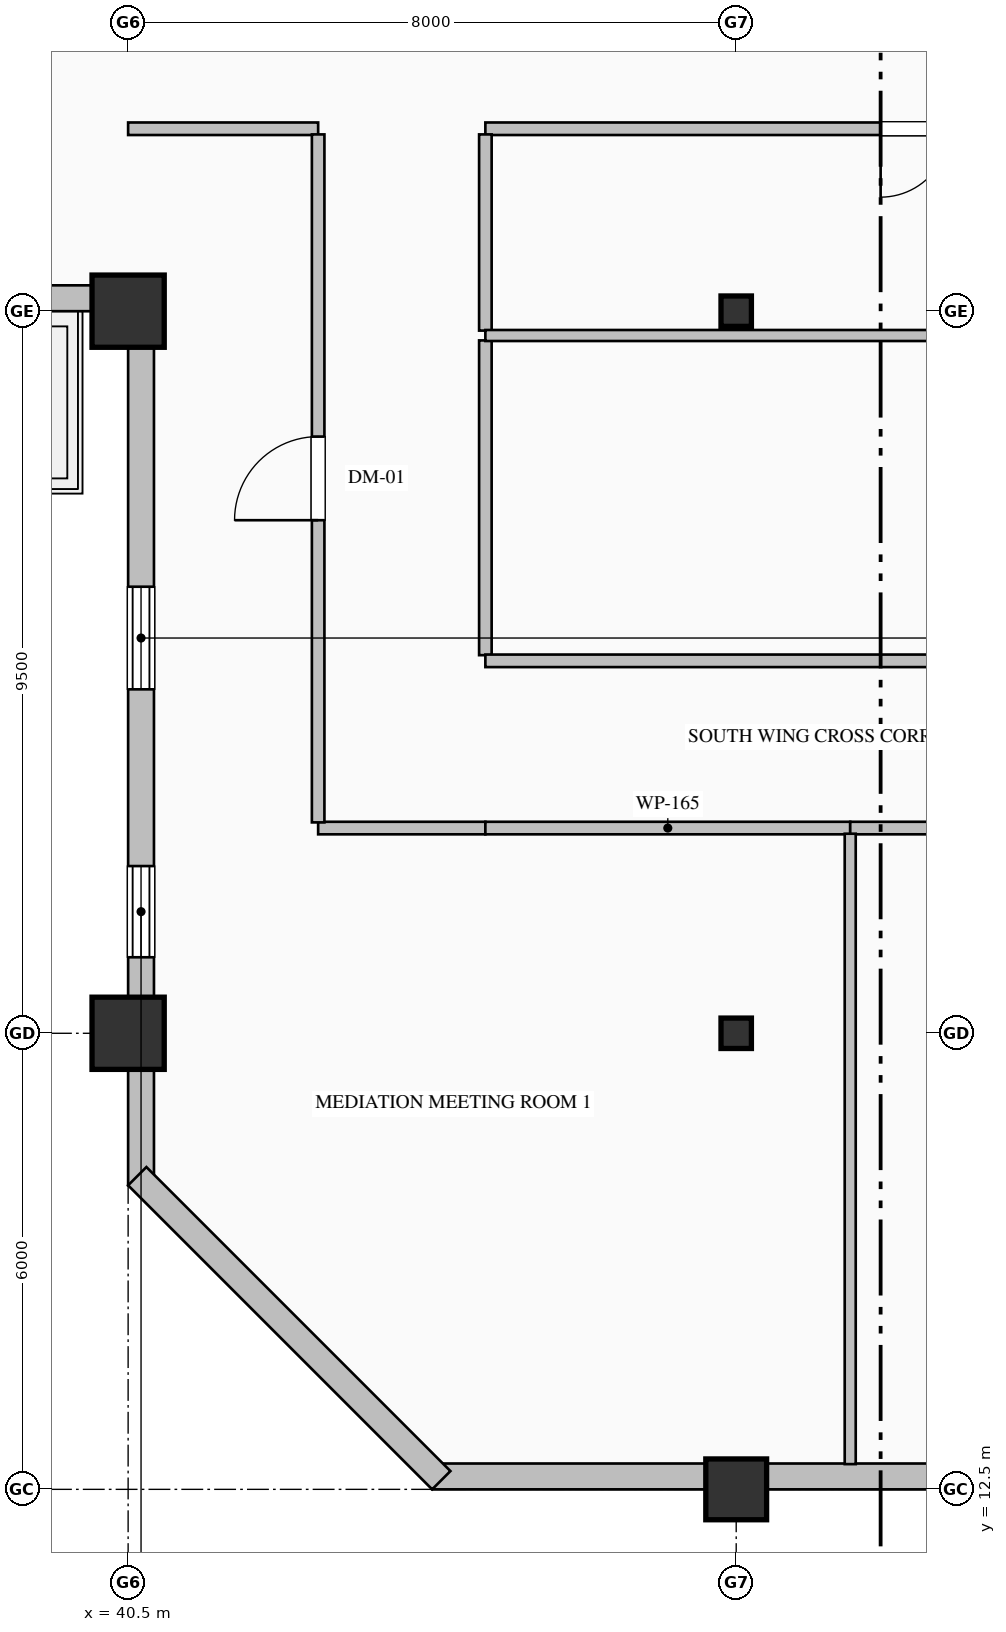
"""IFC4 building model, lengths in metres.
Left out: names, types, materials, properties, quantities, classifications, styles, units other than length and angle.
Written with IfcOpenShell. Run it as: python <this file> out.ifc"""

import sys

from ifc_helpers import new_model, si_unit, direction, frame, frame_2d, origin, origin_2d, place, context, subcontext, project, spatial, rectangle, hollow_rectangle, i_section, extrude, element, fill, save


model = new_model("IFC4")
c1 = context("Model", 3, precision=1e-05, world=origin(), true_north=direction((0.0, 1.0)))
c2 = subcontext(c1, "Body", "Model", "MODEL_VIEW")
j1 = project(units=[si_unit("LENGTHUNIT", "METRE"), si_unit("PLANEANGLEUNIT", "RADIAN")], contexts=[c1])
p1 = place(None, origin())
s1 = spatial("IfcSite", under=j1, at=p1, CompositionType="ELEMENT")
p2 = place(p1, origin())
s2 = spatial("IfcBuilding", under=s1, at=p2, CompositionType="ELEMENT")
p3 = place(p2, frame((0.0, 0.0, 273.8)))
s3 = spatial("IfcBuildingStorey", under=s2, at=p3, CompositionType="ELEMENT", Elevation=273.8)
for number, where, z_axis, x_axis in (
    (1, (40.5, 18.5, 0.0), (0.0, 0.0, 1.0), (1.0, 0.0, 0.0)),
    (2, (40.5, 28.0, 0.0), (0.0, 0.0, 1.0), (1.0, 0.0, 0.0)),
):
    element("IfcColumn", number, at=place(p3, frame(where, z_axis=z_axis, x_axis=x_axis)), inside=s3, PredefinedType="COLUMN", context=c2, shape_type="SweptSolid", body=[
        extrude(hollow_rectangle(XDim=0.95, YDim=0.95, WallThickness=0.036, at=origin_2d()), origin(), (0.0, 0.0, 1.0), 4.0),
    ])
p4 = place(p3, frame((48.5, 12.5, 0.0), z_axis=(0.0, 0.0, 1.0), x_axis=(1.0, 0.0, 0.0)))
e3 = element("IfcColumn", 3, at=p4, inside=s3, PredefinedType="COLUMN", context=c2, shape_type="SweptSolid", body=[
    extrude(hollow_rectangle(XDim=0.8, YDim=0.8, WallThickness=0.032, at=origin_2d()), origin(), (0.0, 0.0, 1.0), 4.0),
])
for number, where, z_axis, x_axis in (
    (4, (48.5, 18.5, 0.0), (0.0, 0.0, 1.0), (1.0, 0.0, 0.0)),
    (5, (48.5, 28.0, 0.0), (0.0, 0.0, 1.0), (1.0, 0.0, 0.0)),
):
    element("IfcColumn", number, at=place(p3, frame(where, z_axis=z_axis, x_axis=x_axis)), inside=s3, PredefinedType="COLUMN", context=c2, shape_type="SweptSolid", body=[
        extrude(i_section(OverallWidth=0.4, OverallDepth=0.4, WebThickness=0.013, FlangeThickness=0.021, FilletRadius=0.022, at=origin_2d()), origin(), (0.0, 0.0, 1.0), 4.0),
    ])
p5 = place(p3, frame((40.67, 16.5, 0.0), z_axis=(0.0, 0.0, 1.0), x_axis=(0.0, 1.0, 0.0)))
e6 = element("IfcWall", 6, at=p5, inside=s3, PredefinedType="SOLIDWALL", context=c2, shape_type="SweptSolid", body=[
    extrude(rectangle(XDim=11.84, YDim=0.34, at=frame_2d((5.92, 0.0))), origin(), (0.0, 0.0, 1.0), 3.187),
])
p6 = place(p5, frame((3.0, 0.0, 0.9)))
e7 = element("IfcOpeningElement", 7, at=p6, cuts=e6, PredefinedType="OPENING", context=c2, shape_type="SweptSolid", body=[
    extrude(rectangle(XDim=1.2, YDim=1.85, at=frame_2d((0.6, 0.925))), frame((0.0, 0.18, 0.0), z_axis=(0.0, -1.0, 0.0), x_axis=(1.0, 0.0, 0.0)), (0.0, 0.0, 1.0), 0.36),
])
p7 = place(p5, frame((6.525, 0.0, 0.9)))
e8 = element("IfcOpeningElement", 8, at=p7, cuts=e6, PredefinedType="OPENING", context=c2, shape_type="SweptSolid", body=[
    extrude(rectangle(XDim=1.35, YDim=1.85, at=frame_2d((0.675, 0.925))), frame((0.0, 0.18, 0.0), z_axis=(0.0, -1.0, 0.0), x_axis=(1.0, 0.0, 0.0)), (0.0, 0.0, 1.0), 0.36),
])
p8 = place(p3, frame((40.52, 28.17, 0.0), z_axis=(0.0, 0.0, 1.0), x_axis=(-1.0, 0.0, 0.0)))
e9 = element("IfcWall", 9, at=p8, inside=s3, PredefinedType="SOLIDWALL", context=c2, shape_type="SweptSolid", body=[
    extrude(rectangle(XDim=27.52, YDim=0.34, at=frame_2d((13.76, 0.0))), origin(), (0.0, 0.0, 1.0), 3.187),
])
p9 = place(p8, frame((13.725, 0.0, 0.9)))
e10 = element("IfcOpeningElement", 10, at=p9, cuts=e9, PredefinedType="OPENING", context=c2, shape_type="SweptSolid", body=[
    extrude(rectangle(XDim=1.35, YDim=1.85, at=frame_2d((0.675, 0.925))), frame((0.0, 0.18, 0.0), z_axis=(0.0, -1.0, 0.0), x_axis=(1.0, 0.0, 0.0)), (0.0, 0.0, 1.0), 0.36),
])
p10 = place(p8, frame((17.4, 0.0, 0.7)))
e11 = element("IfcOpeningElement", 11, at=p10, cuts=e9, PredefinedType="OPENING", context=c2, shape_type="SweptSolid", body=[
    extrude(rectangle(XDim=1.2, YDim=1.85, at=frame_2d((0.6, 0.925))), frame((0.0, 0.18, 0.0), z_axis=(0.0, -1.0, 0.0), x_axis=(1.0, 0.0, 0.0)), (0.0, 0.0, 1.0), 0.36),
])
p11 = place(p8, frame((21.0, 0.0, 0.9)))
e12 = element("IfcOpeningElement", 12, at=p11, cuts=e9, PredefinedType="OPENING", context=c2, shape_type="SweptSolid", body=[
    extrude(rectangle(XDim=1.2, YDim=1.85, at=frame_2d((0.6, 0.925))), frame((0.0, 0.18, 0.0), z_axis=(0.0, -1.0, 0.0), x_axis=(1.0, 0.0, 0.0)), (0.0, 0.0, 1.0), 0.36),
])
p12 = place(p8, frame((11.395, 0.0, 0.0)))
e13 = element("IfcOpeningElement", 13, at=p12, cuts=e9, PredefinedType="OPENING", context=c2, shape_type="SweptSolid", body=[
    extrude(rectangle(XDim=1.25, YDim=2.25, at=frame_2d((0.625, 1.125))), frame((0.0, 0.18, 0.0), z_axis=(0.0, -1.0, 0.0), x_axis=(1.0, 0.0, 0.0)), (0.0, 0.0, 1.0), 0.36),
])
p13 = place(p3, frame((60.0, 12.67, 0.0), z_axis=(0.0, 0.0, 1.0), x_axis=(-1.0, 0.0, 0.0)))
e14 = element("IfcWall", 14, at=p13, inside=s3, PredefinedType="SOLIDWALL", context=c2, shape_type="SweptSolid", body=[
    extrude(rectangle(XDim=15.5, YDim=0.34, at=frame_2d((7.75, 0.0))), origin(), (0.0, 0.0, 1.0), 3.325),
])
p14 = place(p13, frame((6.6, 0.0, 0.9)))
e15 = element("IfcOpeningElement", 15, at=p14, cuts=e14, PredefinedType="OPENING", context=c2, shape_type="SweptSolid", body=[
    extrude(rectangle(XDim=1.2, YDim=1.85, at=frame_2d((0.6, 0.925))), frame((0.0, 0.18, 0.0), z_axis=(0.0, -1.0, 0.0), x_axis=(1.0, 0.0, 0.0)), (0.0, 0.0, 1.0), 0.36),
])
p15 = place(p3, frame((44.62, 12.62, 0.0), z_axis=(0.0, 0.0, 1.0), x_axis=(-0.707106781187, 0.707106781187, 0.0)))
e16 = element("IfcWall", 16, at=p15, inside=s3, PredefinedType="SOLIDWALL", context=c2, shape_type="SweptSolid", body=[
    extrude(rectangle(XDim=5.657, YDim=0.34, at=frame_2d((2.828, 0.0))), origin(), (0.0, 0.0, 1.0), 3.775),
])
p16 = place(p3, frame((56.5, 30.4, 0.0), z_axis=(0.0, 0.0, 1.0), x_axis=(-1.0, 0.0, 0.0)))
e17 = element("IfcWall", 17, at=p16, inside=s3, PredefinedType="PARTITIONING", context=c2, shape_type="SweptSolid", body=[
    extrude(rectangle(XDim=11.3, YDim=0.165, at=frame_2d((5.65, 0.0))), origin(), (0.0, 0.0, 1.0), 3.775),
])
p17 = place(p16, frame((5.2, 0.0, 0.0)))
e18 = element("IfcOpeningElement", 18, at=p17, cuts=e17, PredefinedType="OPENING", context=c2, shape_type="SweptSolid", body=[
    extrude(rectangle(XDim=0.9, YDim=2.15, at=frame_2d((0.45, 1.075))), frame((0.0, 0.093, 0.0), z_axis=(0.0, -1.0, 0.0), x_axis=(1.0, 0.0, 0.0)), (0.0, 0.0, 1.0), 0.185),
])
p18 = place(p3, frame((43.0, 30.4, 0.0), z_axis=(0.0, 0.0, 1.0), x_axis=(-1.0, 0.0, 0.0)))
e19 = element("IfcWall", 19, at=p18, inside=s3, PredefinedType="PARTITIONING", context=c2, shape_type="SweptSolid", body=[
    extrude(rectangle(XDim=2.5, YDim=0.165, at=frame_2d((1.25, 0.0))), origin(), (0.0, 0.0, 1.0), 3.775),
])
p19 = place(p3, frame((45.2, 27.615, 0.0), z_axis=(0.0, 0.0, 1.0), x_axis=(0.0, -1.0, 0.0)))
e20 = element("IfcWall", 20, at=p19, inside=s3, PredefinedType="PARTITIONING", context=c2, shape_type="SweptSolid", body=[
    extrude(rectangle(XDim=4.141, YDim=0.165, at=frame_2d((2.07, 0.0))), origin(), (0.0, 0.0, 1.0), 3.775),
])
p20 = place(p3, frame((45.2, 30.325, 0.0), z_axis=(0.0, 0.0, 1.0), x_axis=(0.0, -1.0, 0.0)))
e21 = element("IfcWall", 21, at=p20, inside=s3, PredefinedType="PARTITIONING", context=c2, shape_type="SweptSolid", body=[
    extrude(rectangle(XDim=2.581, YDim=0.165, at=frame_2d((1.291, 0.0))), origin(), (0.0, 0.0, 1.0), 3.775),
])
p21 = place(p3, frame((45.2, 21.2, 0.0), z_axis=(0.0, 0.0, 1.0), x_axis=(-1.0, 0.0, 0.0)))
e22 = element("IfcWall", 22, at=p21, inside=s3, PredefinedType="PARTITIONING", context=c2, shape_type="SweptSolid", body=[
    extrude(rectangle(XDim=2.2, YDim=0.165, at=frame_2d((1.1, 0.0))), origin(), (0.0, 0.0, 1.0), 3.775),
])
p22 = place(p3, frame((43.0, 21.274, 0.0), z_axis=(0.0, 0.0, 1.0), x_axis=(0.0, 1.0, 0.0)))
e23 = element("IfcWall", 23, at=p22, inside=s3, PredefinedType="PARTITIONING", context=c2, shape_type="SweptSolid", body=[
    extrude(rectangle(XDim=9.051, YDim=0.165, at=frame_2d((4.525, 0.0))), origin(), (0.0, 0.0, 1.0), 3.775),
])
p23 = place(p22, frame((3.976, 0.0, 0.0)))
e24 = element("IfcOpeningElement", 24, at=p23, cuts=e23, PredefinedType="OPENING", context=c2, shape_type="SweptSolid", body=[
    extrude(rectangle(XDim=1.1, YDim=2.2, at=frame_2d((0.55, 1.1))), frame((0.0, 0.093, 0.0), z_axis=(0.0, -1.0, 0.0), x_axis=(1.0, 0.0, 0.0)), (0.0, 0.0, 1.0), 0.185),
])
p24 = place(p3, frame((45.2, 23.4, 0.0), z_axis=(0.0, 0.0, 1.0), x_axis=(1.0, 0.0, 0.0)))
e25 = element("IfcWall", 25, at=p24, inside=s3, PredefinedType="PARTITIONING", context=c2, shape_type="SweptSolid", body=[
    extrude(rectangle(XDim=12.8, YDim=0.165, at=frame_2d((6.4, 0.0))), origin(), (0.0, 0.0, 1.0), 3.467),
])
p25 = place(p24, frame((5.95, 0.0, 0.0)))
e26 = element("IfcOpeningElement", 26, at=p25, cuts=e25, PredefinedType="OPENING", context=c2, shape_type="SweptSolid", body=[
    extrude(rectangle(XDim=0.9, YDim=2.15, at=frame_2d((0.45, 1.075))), frame((0.0, 0.093, 0.0), z_axis=(0.0, -1.0, 0.0), x_axis=(1.0, 0.0, 0.0)), (0.0, 0.0, 1.0), 0.185),
])
p26 = place(p3, frame((50.0, 21.2, 0.0), z_axis=(0.0, 0.0, 1.0), x_axis=(-1.0, 0.0, 0.0)))
e27 = element("IfcWall", 27, at=p26, inside=s3, PredefinedType="PARTITIONING", context=c2, shape_type="SweptSolid", body=[
    extrude(rectangle(XDim=4.8, YDim=0.165, at=frame_2d((2.4, 0.0))), origin(), (0.0, 0.0, 1.0), 3.775),
])
p27 = place(p3, frame((57.0, 21.2, 0.0), z_axis=(0.0, 0.0, 1.0), x_axis=(-1.0, 0.0, 0.0)))
e28 = element("IfcWall", 28, at=p27, inside=s3, PredefinedType="PARTITIONING", context=c2, shape_type="SweptSolid", body=[
    extrude(rectangle(XDim=7.0, YDim=0.165, at=frame_2d((3.5, 0.0))), origin(), (0.0, 0.0, 1.0), 3.775),
])
p28 = place(p27, frame((3.05, 0.0, 0.0)))
e29 = element("IfcOpeningElement", 29, at=p28, cuts=e28, PredefinedType="OPENING", context=c2, shape_type="SweptSolid", body=[
    extrude(rectangle(XDim=0.9, YDim=2.15, at=frame_2d((0.45, 1.075))), frame((0.0, 0.093, 0.0), z_axis=(0.0, -1.0, 0.0), x_axis=(1.0, 0.0, 0.0)), (0.0, 0.0, 1.0), 0.185),
])
p29 = place(p3, frame((45.2, 27.68, 0.0), z_axis=(0.0, 0.0, 1.0), x_axis=(1.0, 0.0, 0.0)))
e30 = element("IfcWall", 30, at=p29, inside=s3, PredefinedType="PARTITIONING", context=c2, shape_type="SweptSolid", body=[
    extrude(rectangle(XDim=18.468, YDim=0.145, at=frame_2d((9.234, 0.0))), origin(), (0.0, 0.0, 1.0), 3.775),
])
p30 = place(p3, frame((50.0, 21.125, 0.0), z_axis=(0.0, 0.0, 1.0), x_axis=(0.0, -1.0, 0.0)))
e31 = element("IfcWall", 31, at=p30, inside=s3, PredefinedType="PARTITIONING", context=c2, shape_type="SweptSolid", body=[
    extrude(rectangle(XDim=8.293, YDim=0.145, at=frame_2d((4.147, 0.0))), origin(), (0.0, 0.0, 1.0), 3.775),
])
p31 = place(p6, origin())
e32 = element("IfcWindow", 32, at=p31, inside=s3, PartitioningType="DOUBLE_PANEL_VERTICAL", PredefinedType="WINDOW", context=c2, shape_type="SweptSolid", body=[
    extrude(rectangle(XDim=1.2, YDim=1.85, at=frame_2d((0.6, 0.925))), frame((0.0, 0.15, 0.0), z_axis=(0.0, -1.0, 0.0), x_axis=(1.0, 0.0, 0.0)), (0.0, 0.0, 1.0), 0.06),
])
fill(e7, e32)
p32 = place(p7, origin())
e33 = element("IfcWindow", 33, at=p32, inside=s3, PartitioningType="DOUBLE_PANEL_VERTICAL", PredefinedType="WINDOW", context=c2, shape_type="SweptSolid", body=[
    extrude(rectangle(XDim=1.35, YDim=1.85, at=frame_2d((0.675, 0.925))), frame((0.0, 0.15, 0.0), z_axis=(0.0, -1.0, 0.0), x_axis=(1.0, 0.0, 0.0)), (0.0, 0.0, 1.0), 0.06),
])
fill(e8, e33)
p33 = place(p17, origin())
e34 = element("IfcDoor", 34, at=p33, inside=s3, OperationType="SINGLE_SWING_RIGHT", PredefinedType="DOOR", context=c2, shape_type="SweptSolid", body=[
    extrude(rectangle(XDim=0.9, YDim=2.15, at=frame_2d((0.45, 1.075))), frame((0.0, 0.025, 0.0), z_axis=(0.0, -1.0, 0.0), x_axis=(1.0, 0.0, 0.0)), (0.0, 0.0, 1.0), 0.05),
])
fill(e18, e34)
p34 = place(p23, origin())
e35 = element("IfcDoor", 35, at=p34, inside=s3, OperationType="SINGLE_SWING_LEFT", PredefinedType="DOOR", context=c2, shape_type="SweptSolid", body=[
    extrude(rectangle(XDim=1.1, YDim=2.2, at=frame_2d((0.55, 1.1))), frame((0.0, 0.025, 0.0), z_axis=(0.0, -1.0, 0.0), x_axis=(1.0, 0.0, 0.0)), (0.0, 0.0, 1.0), 0.05),
])
fill(e24, e35)
save(model, sys.argv[1])
